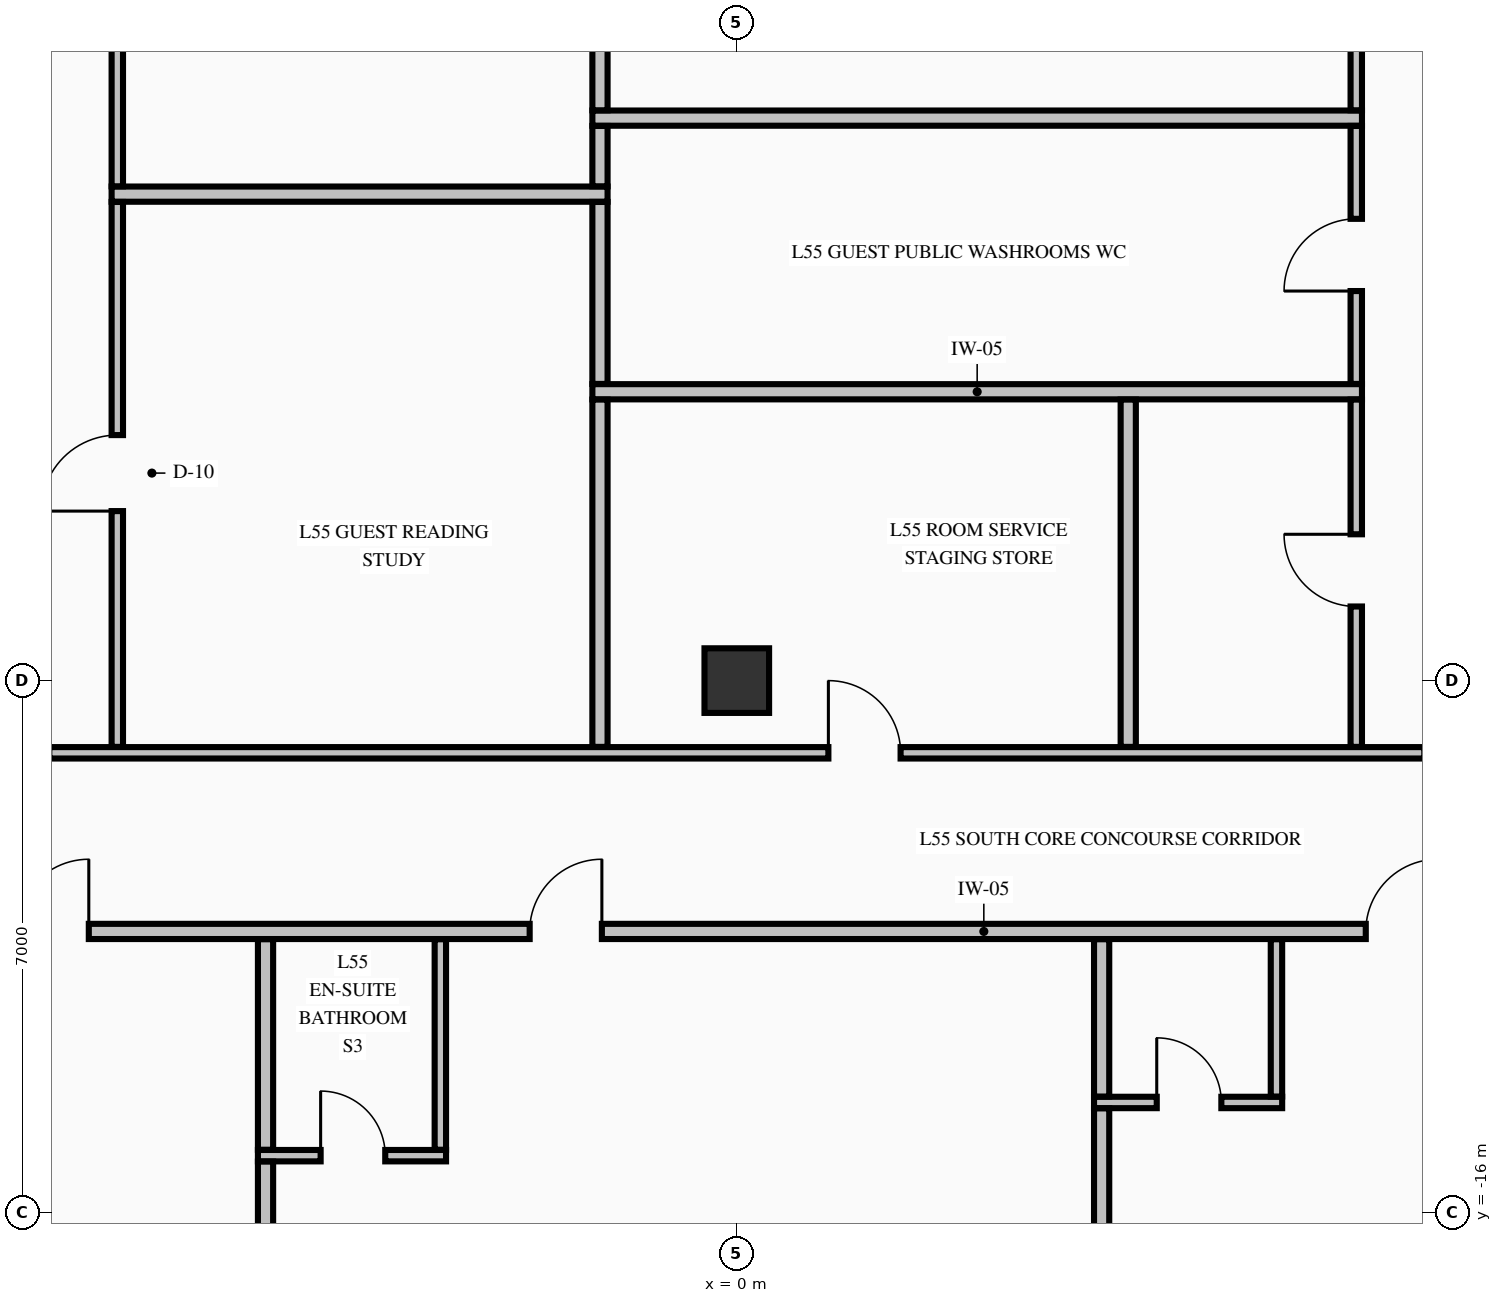
"""IFC4 building model, lengths in metres.
Left out: names, types, materials, properties, quantities, classifications, styles, units other than length and angle.
Written with IfcOpenShell. Run it as: python <this file> out.ifc"""

import sys

from ifc_helpers import new_model, si_unit, direction, frame, frame_2d, origin, origin_2d, place, context, subcontext, project, spatial, rectangle, extrude, element, fill, save


model = new_model("IFC4")
c1 = context("Model", 3, precision=1e-05, world=origin(), true_north=direction((0.0, 1.0)))
c2 = subcontext(c1, "Body", "Model", "MODEL_VIEW")
j1 = project(units=[si_unit("LENGTHUNIT", "METRE"), si_unit("PLANEANGLEUNIT", "RADIAN")], contexts=[c1])
p1 = place(None, origin())
s1 = spatial("IfcSite", under=j1, at=p1, CompositionType="ELEMENT")
p2 = place(p1, origin())
s2 = spatial("IfcBuilding", under=s1, at=p2, CompositionType="ELEMENT")
p3 = place(p2, frame((0.0, 0.0, 211.86)))
s3 = spatial("IfcBuildingStorey", under=s2, at=p3, CompositionType="ELEMENT", Elevation=211.86)
p4 = place(p3, frame((0.0, -9.0, -0.325), z_axis=(0.0, 0.0, 1.0), x_axis=(1.0, 0.0, 0.0)))
e1 = element("IfcColumn", 1, at=p4, inside=s3, PredefinedType="COLUMN", context=c2, shape_type="SweptSolid", body=[
    extrude(rectangle(XDim=0.85, YDim=0.85, at=origin_2d()), origin(), (0.0, 0.0, 1.0), 3.475),
])
p5 = place(p3, frame((-6.3, -15.25, 0.0), z_axis=(0.0, 0.0, 1.0), x_axis=(1.0, 0.0, 0.0)))
e2 = element("IfcWall", 2, at=p5, inside=s3, PredefinedType="PARTITIONING", context=c2, shape_type="SweptSolid", body=[
    extrude(rectangle(XDim=2.475, YDim=0.15, at=frame_2d((1.238, 0.0))), origin(), (0.0, 0.0, 1.0), 3.15),
])
p6 = place(p5, frame((0.825, 0.0, 0.0)))
e3 = element("IfcOpeningElement", 3, at=p6, cuts=e2, PredefinedType="OPENING", context=c2, shape_type="SweptSolid", body=[
    extrude(rectangle(XDim=0.85, YDim=2.1, at=frame_2d((0.425, 1.05))), frame((0.0, 0.085, 0.0), z_axis=(0.0, -1.0, 0.0), x_axis=(1.0, 0.0, 0.0)), (0.0, 0.0, 1.0), 0.17),
])
p7 = place(p3, frame((4.7, -14.55, 0.0), z_axis=(0.0, 0.0, 1.0), x_axis=(1.0, 0.0, 0.0)))
e4 = element("IfcWall", 4, at=p7, inside=s3, PredefinedType="PARTITIONING", context=c2, shape_type="SweptSolid", body=[
    extrude(rectangle(XDim=2.475, YDim=0.15, at=frame_2d((1.238, 0.0))), origin(), (0.0, 0.0, 1.0), 3.15),
])
p8 = place(p7, frame((0.825, 0.0, 0.0)))
e5 = element("IfcOpeningElement", 5, at=p8, cuts=e4, PredefinedType="OPENING", context=c2, shape_type="SweptSolid", body=[
    extrude(rectangle(XDim=0.85, YDim=2.1, at=frame_2d((0.425, 1.05))), frame((0.0, 0.085, 0.0), z_axis=(0.0, -1.0, 0.0), x_axis=(1.0, 0.0, 0.0)), (0.0, 0.0, 1.0), 0.17),
])
p9 = place(p3, frame((-22.1, -12.3, 0.0), z_axis=(0.0, 0.0, 1.0), x_axis=(1.0, 0.0, 0.0)))
e6 = element("IfcWall", 6, at=p9, inside=s3, PredefinedType="PARTITIONING", context=c2, shape_type="SweptSolid", body=[
    extrude(rectangle(XDim=39.2, YDim=0.2, at=frame_2d((19.6, 0.0))), origin(), (0.0, 0.0, 1.0), 3.15),
])
p10 = place(p9, frame((4.725, 0.0, 0.0)))
e7 = element("IfcOpeningElement", 7, at=p10, cuts=e6, PredefinedType="OPENING", context=c2, shape_type="SweptSolid", body=[
    extrude(rectangle(XDim=0.95, YDim=2.15, at=frame_2d((0.475, 1.075))), frame((0.0, 0.11, 0.0), z_axis=(0.0, -1.0, 0.0), x_axis=(1.0, 0.0, 0.0)), (0.0, 0.0, 1.0), 0.22),
])
p11 = place(p9, frame((12.625, 0.0, 0.0)))
e8 = element("IfcOpeningElement", 8, at=p11, cuts=e6, PredefinedType="OPENING", context=c2, shape_type="SweptSolid", body=[
    extrude(rectangle(XDim=0.95, YDim=2.15, at=frame_2d((0.475, 1.075))), frame((0.0, 0.11, 0.0), z_axis=(0.0, -1.0, 0.0), x_axis=(1.0, 0.0, 0.0)), (0.0, 0.0, 1.0), 0.22),
])
p12 = place(p9, frame((19.375, 0.0, 0.0)))
e9 = element("IfcOpeningElement", 9, at=p12, cuts=e6, PredefinedType="OPENING", context=c2, shape_type="SweptSolid", body=[
    extrude(rectangle(XDim=0.95, YDim=2.15, at=frame_2d((0.475, 1.075))), frame((0.0, 0.11, 0.0), z_axis=(0.0, -1.0, 0.0), x_axis=(1.0, 0.0, 0.0)), (0.0, 0.0, 1.0), 0.22),
])
p13 = place(p9, frame((30.375, 0.0, 0.0)))
e10 = element("IfcOpeningElement", 10, at=p13, cuts=e6, PredefinedType="OPENING", context=c2, shape_type="SweptSolid", body=[
    extrude(rectangle(XDim=0.95, YDim=2.15, at=frame_2d((0.475, 1.075))), frame((0.0, 0.11, 0.0), z_axis=(0.0, -1.0, 0.0), x_axis=(1.0, 0.0, 0.0)), (0.0, 0.0, 1.0), 0.22),
])
p14 = place(p3, frame((-10.569, -9.95, 0.0), z_axis=(0.0, 0.0, 1.0), x_axis=(1.0, 0.0, 0.0)))
e11 = element("IfcWall", 11, at=p14, inside=s3, PredefinedType="PARTITIONING", context=c2, shape_type="SweptSolid", body=[
    extrude(rectangle(XDim=21.138, YDim=0.15, at=frame_2d((10.569, 0.0))), origin(), (0.0, 0.0, 1.0), 3.15),
])
p15 = place(p14, frame((0.474, 0.0, 0.0)))
e12 = element("IfcOpeningElement", 12, at=p15, cuts=e11, PredefinedType="OPENING", context=c2, shape_type="SweptSolid", body=[
    extrude(rectangle(XDim=1.05, YDim=2.15, at=frame_2d((0.525, 1.075))), frame((0.0, 0.085, 0.0), z_axis=(0.0, -1.0, 0.0), x_axis=(1.0, 0.0, 0.0)), (0.0, 0.0, 1.0), 0.17),
])
p16 = place(p14, frame((19.614, 0.0, 0.0)))
e13 = element("IfcOpeningElement", 13, at=p16, cuts=e11, PredefinedType="OPENING", context=c2, shape_type="SweptSolid", body=[
    extrude(rectangle(XDim=1.05, YDim=2.15, at=frame_2d((0.525, 1.075))), frame((0.0, 0.085, 0.0), z_axis=(0.0, -1.0, 0.0), x_axis=(1.0, 0.0, 0.0)), (0.0, 0.0, 1.0), 0.17),
])
p17 = place(p14, frame((11.774, 0.0, 0.0)))
e14 = element("IfcOpeningElement", 14, at=p17, cuts=e11, PredefinedType="OPENING", context=c2, shape_type="SweptSolid", body=[
    extrude(rectangle(XDim=0.95, YDim=2.15, at=frame_2d((0.475, 1.075))), frame((0.0, 0.085, 0.0), z_axis=(0.0, -1.0, 0.0), x_axis=(1.0, 0.0, 0.0)), (0.0, 0.0, 1.0), 0.17),
])
p18 = place(p3, frame((-1.9, -5.2, 0.0), z_axis=(0.0, 0.0, 1.0), x_axis=(1.0, 0.0, 0.0)))
e15 = element("IfcWall", 15, at=p18, inside=s3, PredefinedType="PARTITIONING", context=c2, shape_type="SweptSolid", body=[
    extrude(rectangle(XDim=10.125, YDim=0.2, at=frame_2d((5.062, 0.0))), origin(), (0.0, 0.0, 1.0), 3.15),
])
p19 = place(p3, frame((-8.225, -2.6, 0.0), z_axis=(0.0, 0.0, 1.0), x_axis=(1.0, 0.0, 0.0)))
e16 = element("IfcWall", 16, at=p19, inside=s3, PredefinedType="PARTITIONING", context=c2, shape_type="SweptSolid", body=[
    extrude(rectangle(XDim=6.525, YDim=0.2, at=frame_2d((3.263, 0.0))), origin(), (0.0, 0.0, 1.0), 3.15),
])
p20 = place(p3, frame((-1.9, -1.6, 0.0), z_axis=(0.0, 0.0, 1.0), x_axis=(1.0, 0.0, 0.0)))
e17 = element("IfcWall", 17, at=p20, inside=s3, PredefinedType="PARTITIONING", context=c2, shape_type="SweptSolid", body=[
    extrude(rectangle(XDim=10.125, YDim=0.2, at=frame_2d((5.062, 0.0))), origin(), (0.0, 0.0, 1.0), 3.15),
])
p21 = place(p3, frame((-8.15, -9.872, 0.0), z_axis=(0.0, 0.0, 1.0), x_axis=(0.0, 1.0, 0.0)))
e18 = element("IfcWall", 18, at=p21, inside=s3, PredefinedType="PARTITIONING", context=c2, shape_type="SweptSolid", body=[
    extrude(rectangle(XDim=7.169, YDim=0.15, at=frame_2d((3.584, 0.0))), origin(), (0.0, 0.0, 1.0), 3.15),
])
p22 = place(p21, frame((3.102, 0.0, 0.0)))
e19 = element("IfcOpeningElement", 19, at=p22, cuts=e18, PredefinedType="OPENING", context=c2, shape_type="SweptSolid", body=[
    extrude(rectangle(XDim=1.0, YDim=2.15, at=frame_2d((0.5, 1.075))), frame((0.0, 0.085, 0.0), z_axis=(0.0, -1.0, 0.0), x_axis=(1.0, 0.0, 0.0)), (0.0, 0.0, 1.0), 0.17),
])
p23 = place(p3, frame((-8.15, -2.497, 0.0), z_axis=(0.0, 0.0, 1.0), x_axis=(0.0, 1.0, 0.0)))
e20 = element("IfcWall", 20, at=p23, inside=s3, PredefinedType="PARTITIONING", context=c2, shape_type="SweptSolid", body=[
    extrude(rectangle(XDim=12.919, YDim=0.15, at=frame_2d((6.459, 0.0))), origin(), (0.0, 0.0, 1.0), 3.15),
])
p24 = place(p23, frame((5.897, 0.0, 0.0)))
e21 = element("IfcOpeningElement", 21, at=p24, cuts=e20, PredefinedType="OPENING", context=c2, shape_type="SweptSolid", body=[
    extrude(rectangle(XDim=1.1, YDim=2.15, at=frame_2d((0.55, 1.075))), frame((0.0, 0.085, 0.0), z_axis=(0.0, -1.0, 0.0), x_axis=(1.0, 0.0, 0.0)), (0.0, 0.0, 1.0), 0.17),
])
p25 = place(p3, frame((-6.2, -24.335, 0.0), z_axis=(0.0, 0.0, 1.0), x_axis=(0.0, 1.0, 0.0)))
e22 = element("IfcWall", 22, at=p25, inside=s3, PredefinedType="PARTITIONING", context=c2, shape_type="SweptSolid", body=[
    extrude(rectangle(XDim=9.007, YDim=0.2, at=frame_2d((4.503, 0.0))), origin(), (0.0, 0.0, 1.0), 3.15),
])
p26 = place(p3, frame((-6.2, -15.172, 0.0), z_axis=(0.0, 0.0, 1.0), x_axis=(0.0, 1.0, 0.0)))
e23 = element("IfcWall", 23, at=p26, inside=s3, PredefinedType="PARTITIONING", context=c2, shape_type="SweptSolid", body=[
    extrude(rectangle(XDim=2.769, YDim=0.2, at=frame_2d((1.385, 0.0))), origin(), (0.0, 0.0, 1.0), 3.15),
])
p27 = place(p3, frame((-3.9, -15.172, 0.0), z_axis=(0.0, 0.0, 1.0), x_axis=(0.0, 1.0, 0.0)))
e24 = element("IfcWall", 24, at=p27, inside=s3, PredefinedType="PARTITIONING", context=c2, shape_type="SweptSolid", body=[
    extrude(rectangle(XDim=2.769, YDim=0.15, at=frame_2d((1.385, 0.0))), origin(), (0.0, 0.0, 1.0), 3.15),
])
p28 = place(p3, frame((-1.8, -9.872, 0.0), z_axis=(0.0, 0.0, 1.0), x_axis=(0.0, 1.0, 0.0)))
e25 = element("IfcWall", 25, at=p28, inside=s3, PredefinedType="PARTITIONING", context=c2, shape_type="SweptSolid", body=[
    extrude(rectangle(XDim=4.569, YDim=0.2, at=frame_2d((2.285, 0.0))), origin(), (0.0, 0.0, 1.0), 3.15),
])
p29 = place(p3, frame((-1.8, -5.097, 0.0), z_axis=(0.0, 0.0, 1.0), x_axis=(0.0, 1.0, 0.0)))
e26 = element("IfcWall", 26, at=p29, inside=s3, PredefinedType="PARTITIONING", context=c2, shape_type="SweptSolid", body=[
    extrude(rectangle(XDim=2.394, YDim=0.2, at=frame_2d((1.197, 0.0))), origin(), (0.0, 0.0, 1.0), 3.15),
])
p30 = place(p3, frame((-1.8, -2.497, 0.0), z_axis=(0.0, 0.0, 1.0), x_axis=(0.0, 1.0, 0.0)))
e27 = element("IfcWall", 27, at=p30, inside=s3, PredefinedType="PARTITIONING", context=c2, shape_type="SweptSolid", body=[
    extrude(rectangle(XDim=0.794, YDim=0.2, at=frame_2d((0.397, 0.0))), origin(), (0.0, 0.0, 1.0), 3.15),
])
p31 = place(p3, frame((-1.8, -1.497, 0.0), z_axis=(0.0, 0.0, 1.0), x_axis=(0.0, 1.0, 0.0)))
e28 = element("IfcWall", 28, at=p31, inside=s3, PredefinedType="PARTITIONING", context=c2, shape_type="SweptSolid", body=[
    extrude(rectangle(XDim=11.919, YDim=0.2, at=frame_2d((5.959, 0.0))), origin(), (0.0, 0.0, 1.0), 3.15),
])
p32 = place(p3, frame((4.8, -24.335, 0.0), z_axis=(0.0, 0.0, 1.0), x_axis=(0.0, 1.0, 0.0)))
e29 = element("IfcWall", 29, at=p32, inside=s3, PredefinedType="PARTITIONING", context=c2, shape_type="SweptSolid", body=[
    extrude(rectangle(XDim=9.707, YDim=0.2, at=frame_2d((4.854, 0.0))), origin(), (0.0, 0.0, 1.0), 3.15),
])
p33 = place(p3, frame((4.8, -14.472, 0.0), z_axis=(0.0, 0.0, 1.0), x_axis=(0.0, 1.0, 0.0)))
e30 = element("IfcWall", 30, at=p33, inside=s3, PredefinedType="PARTITIONING", context=c2, shape_type="SweptSolid", body=[
    extrude(rectangle(XDim=2.069, YDim=0.2, at=frame_2d((1.034, 0.0))), origin(), (0.0, 0.0, 1.0), 3.15),
])
p34 = place(p3, frame((5.15, -9.872, 0.0), z_axis=(0.0, 0.0, 1.0), x_axis=(0.0, 1.0, 0.0)))
e31 = element("IfcWall", 31, at=p34, inside=s3, PredefinedType="PARTITIONING", context=c2, shape_type="SweptSolid", body=[
    extrude(rectangle(XDim=4.569, YDim=0.2, at=frame_2d((2.285, 0.0))), origin(), (0.0, 0.0, 1.0), 3.15),
])
p35 = place(p3, frame((7.1, -14.472, 0.0), z_axis=(0.0, 0.0, 1.0), x_axis=(0.0, 1.0, 0.0)))
e32 = element("IfcWall", 32, at=p35, inside=s3, PredefinedType="PARTITIONING", context=c2, shape_type="SweptSolid", body=[
    extrude(rectangle(XDim=2.069, YDim=0.15, at=frame_2d((1.034, 0.0))), origin(), (0.0, 0.0, 1.0), 3.15),
])
p36 = place(p3, frame((8.15, -9.872, 0.0), z_axis=(0.0, 0.0, 1.0), x_axis=(0.0, 1.0, 0.0)))
e33 = element("IfcWall", 33, at=p36, inside=s3, PredefinedType="PARTITIONING", context=c2, shape_type="SweptSolid", body=[
    extrude(rectangle(XDim=4.569, YDim=0.15, at=frame_2d((2.285, 0.0))), origin(), (0.0, 0.0, 1.0), 3.15),
])
p37 = place(p36, frame((1.847, 0.0, 0.0)))
e34 = element("IfcOpeningElement", 34, at=p37, cuts=e33, PredefinedType="OPENING", context=c2, shape_type="SweptSolid", body=[
    extrude(rectangle(XDim=0.95, YDim=2.15, at=frame_2d((0.475, 1.075))), frame((0.0, 0.085, 0.0), z_axis=(0.0, -1.0, 0.0), x_axis=(1.0, 0.0, 0.0)), (0.0, 0.0, 1.0), 0.17),
])
p38 = place(p3, frame((8.15, -5.097, 0.0), z_axis=(0.0, 0.0, 1.0), x_axis=(0.0, 1.0, 0.0)))
e35 = element("IfcWall", 35, at=p38, inside=s3, PredefinedType="PARTITIONING", context=c2, shape_type="SweptSolid", body=[
    extrude(rectangle(XDim=3.394, YDim=0.15, at=frame_2d((1.697, 0.0))), origin(), (0.0, 0.0, 1.0), 3.15),
])
p39 = place(p38, frame((1.222, 0.0, 0.0)))
e36 = element("IfcOpeningElement", 36, at=p39, cuts=e35, PredefinedType="OPENING", context=c2, shape_type="SweptSolid", body=[
    extrude(rectangle(XDim=0.95, YDim=2.15, at=frame_2d((0.475, 1.075))), frame((0.0, 0.085, 0.0), z_axis=(0.0, -1.0, 0.0), x_axis=(1.0, 0.0, 0.0)), (0.0, 0.0, 1.0), 0.17),
])
p40 = place(p3, frame((8.15, -1.497, 0.0), z_axis=(0.0, 0.0, 1.0), x_axis=(0.0, 1.0, 0.0)))
e37 = element("IfcWall", 37, at=p40, inside=s3, PredefinedType="PARTITIONING", context=c2, shape_type="SweptSolid", body=[
    extrude(rectangle(XDim=11.919, YDim=0.15, at=frame_2d((5.959, 0.0))), origin(), (0.0, 0.0, 1.0), 3.15),
])
p41 = place(p40, frame((5.397, 0.0, 0.0)))
e38 = element("IfcOpeningElement", 38, at=p41, cuts=e37, PredefinedType="OPENING", context=c2, shape_type="SweptSolid", body=[
    extrude(rectangle(XDim=1.1, YDim=2.15, at=frame_2d((0.55, 1.075))), frame((0.0, 0.085, 0.0), z_axis=(0.0, -1.0, 0.0), x_axis=(1.0, 0.0, 0.0)), (0.0, 0.0, 1.0), 0.17),
])
p42 = place(p11, origin())
e39 = element("IfcDoor", 39, at=p42, inside=s3, OperationType="SINGLE_SWING_RIGHT", PredefinedType="DOOR", context=c2, shape_type="SweptSolid", body=[
    extrude(rectangle(XDim=0.95, YDim=2.15, at=frame_2d((0.475, 1.075))), frame((0.0, 0.025, 0.0), z_axis=(0.0, -1.0, 0.0), x_axis=(1.0, 0.0, 0.0)), (0.0, 0.0, 1.0), 0.05),
])
fill(e8, e39)
p43 = place(p12, origin())
e40 = element("IfcDoor", 40, at=p43, inside=s3, OperationType="SINGLE_SWING_RIGHT", PredefinedType="DOOR", context=c2, shape_type="SweptSolid", body=[
    extrude(rectangle(XDim=0.95, YDim=2.15, at=frame_2d((0.475, 1.075))), frame((0.0, 0.025, 0.0), z_axis=(0.0, -1.0, 0.0), x_axis=(1.0, 0.0, 0.0)), (0.0, 0.0, 1.0), 0.05),
])
fill(e9, e40)
p44 = place(p6, origin())
e41 = element("IfcDoor", 41, at=p44, inside=s3, OperationType="SINGLE_SWING_LEFT", PredefinedType="DOOR", context=c2, shape_type="SweptSolid", body=[
    extrude(rectangle(XDim=0.85, YDim=2.1, at=frame_2d((0.425, 1.05))), frame((0.0, 0.025, 0.0), z_axis=(0.0, -1.0, 0.0), x_axis=(1.0, 0.0, 0.0)), (0.0, 0.0, 1.0), 0.05),
])
fill(e3, e41)
p45 = place(p13, origin())
e42 = element("IfcDoor", 42, at=p45, inside=s3, OperationType="SINGLE_SWING_RIGHT", PredefinedType="DOOR", context=c2, shape_type="SweptSolid", body=[
    extrude(rectangle(XDim=0.95, YDim=2.15, at=frame_2d((0.475, 1.075))), frame((0.0, 0.025, 0.0), z_axis=(0.0, -1.0, 0.0), x_axis=(1.0, 0.0, 0.0)), (0.0, 0.0, 1.0), 0.05),
])
fill(e10, e42)
p46 = place(p8, origin())
e43 = element("IfcDoor", 43, at=p46, inside=s3, OperationType="SINGLE_SWING_LEFT", PredefinedType="DOOR", context=c2, shape_type="SweptSolid", body=[
    extrude(rectangle(XDim=0.85, YDim=2.1, at=frame_2d((0.425, 1.05))), frame((0.0, 0.025, 0.0), z_axis=(0.0, -1.0, 0.0), x_axis=(1.0, 0.0, 0.0)), (0.0, 0.0, 1.0), 0.05),
])
fill(e5, e43)
p47 = place(p22, origin())
e44 = element("IfcDoor", 44, at=p47, inside=s3, OperationType="SINGLE_SWING_LEFT", PredefinedType="DOOR", context=c2, shape_type="SweptSolid", body=[
    extrude(rectangle(XDim=1.0, YDim=2.15, at=frame_2d((0.5, 1.075))), frame((0.0, 0.025, 0.0), z_axis=(0.0, -1.0, 0.0), x_axis=(1.0, 0.0, 0.0)), (0.0, 0.0, 1.0), 0.05),
])
fill(e19, e44)
p48 = place(p39, origin())
e45 = element("IfcDoor", 45, at=p48, inside=s3, OperationType="SINGLE_SWING_LEFT", PredefinedType="DOOR", context=c2, shape_type="SweptSolid", body=[
    extrude(rectangle(XDim=0.95, YDim=2.15, at=frame_2d((0.475, 1.075))), frame((0.0, 0.025, 0.0), z_axis=(0.0, -1.0, 0.0), x_axis=(1.0, 0.0, 0.0)), (0.0, 0.0, 1.0), 0.05),
])
fill(e36, e45)
p49 = place(p37, origin())
e46 = element("IfcDoor", 46, at=p49, inside=s3, OperationType="SINGLE_SWING_RIGHT", PredefinedType="DOOR", context=c2, shape_type="SweptSolid", body=[
    extrude(rectangle(XDim=0.95, YDim=2.15, at=frame_2d((0.475, 1.075))), frame((0.0, 0.025, 0.0), z_axis=(0.0, -1.0, 0.0), x_axis=(1.0, 0.0, 0.0)), (0.0, 0.0, 1.0), 0.05),
])
fill(e34, e46)
p50 = place(p17, origin())
e47 = element("IfcDoor", 47, at=p50, inside=s3, OperationType="SINGLE_SWING_LEFT", PredefinedType="DOOR", context=c2, shape_type="SweptSolid", body=[
    extrude(rectangle(XDim=0.95, YDim=2.15, at=frame_2d((0.475, 1.075))), frame((0.0, 0.025, 0.0), z_axis=(0.0, -1.0, 0.0), x_axis=(1.0, 0.0, 0.0)), (0.0, 0.0, 1.0), 0.05),
])
fill(e14, e47)
save(model, sys.argv[1])
